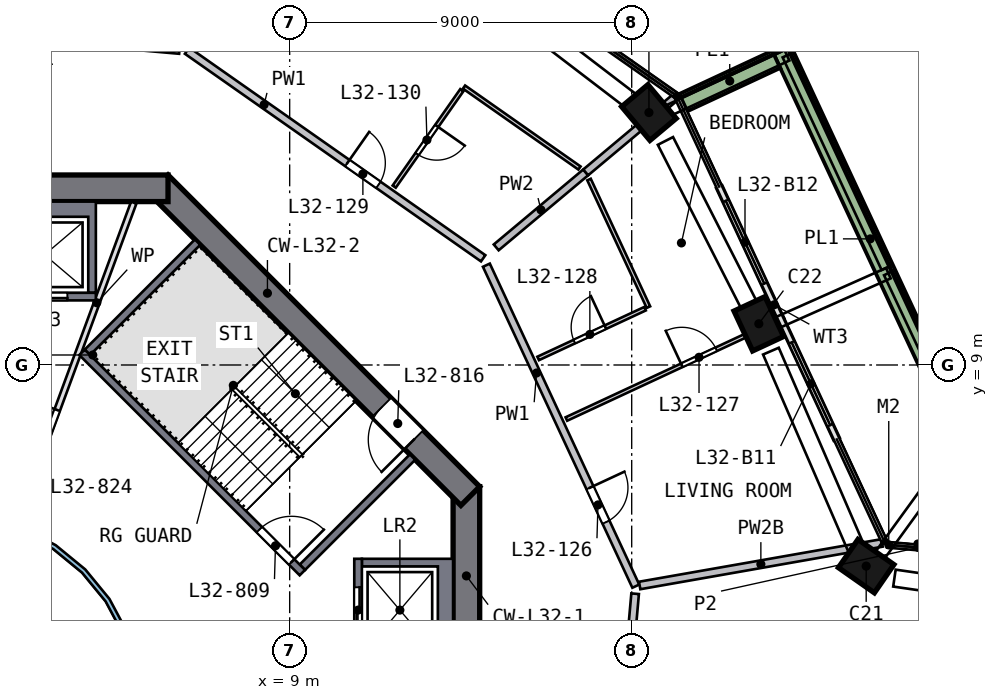
"""IFC4 building model, lengths in metres.
Left out: names, types, materials, properties, quantities, classifications, styles, units other than length and angle.
Written with IfcOpenShell. Run it as: python <this file> out.ifc"""

import sys

from ifc_helpers import new_model, si_unit, direction, frame, frame_2d, origin, origin_2d, place, context, subcontext, project, spatial, polyline, rectangle, outline, extrude, element, fill, save


model = new_model("IFC4")
c1 = context("Model", 3, precision=1e-05, world=origin(), true_north=direction((0.0, 1.0)))
c2 = subcontext(c1, "Body", "Model", "MODEL_VIEW")
j1 = project(units=[si_unit("LENGTHUNIT", "METRE"), si_unit("PLANEANGLEUNIT", "RADIAN")], contexts=[c1])
p1 = place(None, origin())
s1 = spatial("IfcSite", under=j1, at=p1, CompositionType="ELEMENT")
p2 = place(p1, origin())
s2 = spatial("IfcBuilding", under=s1, at=p2, CompositionType="ELEMENT")
p3 = place(p2, frame((0.0, 0.0, 136.5)))
s3 = spatial("IfcBuildingStorey", under=s2, at=p3, CompositionType="ELEMENT", Elevation=136.5)
p4 = place(p3, frame((24.192, 3.569, 0.0), z_axis=(-0.01793968, 0.114859561, 0.993219739), x_axis=(0.820036347, -0.566644336, 0.080340439)))
e1 = element("IfcColumn", 1, at=p4, inside=s3, PredefinedType="COLUMN", context=c2, shape_type="SweptSolid", body=[
    extrude(rectangle(XDim=1.15, YDim=0.9, at=origin_2d()), origin(), (0.0, 0.0, 1.0), 3.212),
])
p5 = place(p3, frame((21.403, 9.962, 0.0), z_axis=(-0.048216176, 0.101375651, 0.993679112), x_axis=(-0.419168471, 0.90094221, -0.112253848)))
e2 = element("IfcColumn", 2, at=p5, inside=s3, PredefinedType="COLUMN", context=c2, shape_type="SweptSolid", body=[
    extrude(rectangle(XDim=1.15, YDim=0.9, at=origin_2d()), origin(), (0.0, 0.0, 1.0), 3.21),
])
p6 = place(p3, frame((18.543, 15.538, 0.0), z_axis=(-0.074581932, 0.087582452, 0.993361389), x_axis=(0.637591081, -0.761738409, 0.115031341)))
e3 = element("IfcColumn", 3, at=p6, inside=s3, PredefinedType="COLUMN", context=c2, shape_type="SweptSolid", body=[
    extrude(rectangle(XDim=1.15, YDim=0.9, at=origin_2d()), origin(), (0.0, 0.0, 1.0), 3.211),
])
p7 = place(p3, frame((13.65, -5.799, 0.0), z_axis=(0.0, 0.0, 1.0), x_axis=(0.0, 1.0, 0.0)))
e4 = element("IfcWall", 4, at=p7, inside=s3, PredefinedType="SHEAR", context=c2, shape_type="SweptSolid", body=[
    extrude(rectangle(XDim=11.598, YDim=0.7, at=frame_2d((5.799, 0.0))), origin(), (0.0, 0.0, 1.0), 3.5),
])
p8 = place(p7, frame((4.899, 0.0, 0.0)))
e5 = element("IfcOpeningElement", 5, at=p8, cuts=e4, PredefinedType="OPENING", context=c2, shape_type="SweptSolid", body=[
    extrude(rectangle(XDim=1.8, YDim=2.1, at=frame_2d((0.9, 1.05))), frame((0.0, 0.36, 0.0), z_axis=(0.0, -1.0, 0.0), x_axis=(1.0, 0.0, 0.0)), (0.0, 0.0, 1.0), 0.72),
])
p9 = place(p3, frame((13.752, 5.552, 0.0), z_axis=(0.0, 0.0, 1.0), x_axis=(-0.707106781, 0.707106781, 0.0)))
e6 = element("IfcWall", 6, at=p9, inside=s3, PredefinedType="SHEAR", context=c2, shape_type="SweptSolid", body=[
    extrude(rectangle(XDim=11.598, YDim=0.7, at=frame_2d((5.799, 0.0))), origin(), (0.0, 0.0, 1.0), 3.5),
])
p10 = place(p9, frame((2.099, 0.0, 0.0)))
e7 = element("IfcOpeningElement", 7, at=p10, cuts=e6, PredefinedType="OPENING", context=c2, shape_type="SweptSolid", body=[
    extrude(rectangle(XDim=1.2, YDim=2.1, at=frame_2d((0.6, 1.05))), frame((0.0, 0.36, 0.0), z_axis=(0.0, -1.0, 0.0), x_axis=(1.0, 0.0, 0.0)), (0.0, 0.0, 1.0), 0.72),
])
p11 = place(p3, frame((5.799, 13.65, 0.0), z_axis=(0.0, 0.0, 1.0), x_axis=(-1.0, 0.0, 0.0)))
e8 = element("IfcWall", 8, at=p11, inside=s3, PredefinedType="SHEAR", context=c2, shape_type="SweptSolid", body=[
    extrude(rectangle(XDim=11.598, YDim=0.7, at=frame_2d((5.799, 0.0))), origin(), (0.0, 0.0, 1.0), 3.5),
])
p12 = place(p11, frame((4.899, 0.0, 0.0)))
e9 = element("IfcOpeningElement", 9, at=p12, cuts=e8, PredefinedType="OPENING", context=c2, shape_type="SweptSolid", body=[
    extrude(rectangle(XDim=1.8, YDim=2.1, at=frame_2d((0.9, 1.05))), frame((0.0, 0.36, 0.0), z_axis=(0.0, -1.0, 0.0), x_axis=(1.0, 0.0, 0.0)), (0.0, 0.0, 1.0), 0.72),
])
p13 = place(p3, frame((23.391, 7.055, 0.0), z_axis=(0.0, 0.0, 1.0), x_axis=(-0.422027589, 0.906582988, 0.0)))
e10 = element("IfcWall", 10, at=p13, inside=s3, PredefinedType="SOLIDWALL", context=c2, shape_type="SweptSolid", body=[
    extrude(rectangle(XDim=3.475, YDim=0.15, at=frame_2d((1.738, 0.0))), origin(), (0.0, 0.0, 1.0), 2.475),
])
p14 = place(p13, frame((0.4, 0.0, 0.0)))
e11 = element("IfcOpeningElement", 11, at=p14, cuts=e10, PredefinedType="OPENING", context=c2, shape_type="SweptSolid", body=[
    extrude(rectangle(XDim=2.4, YDim=2.4, at=frame_2d((1.2, 1.2))), frame((0.0, 0.085, 0.0), z_axis=(0.0, -1.0, 0.0), x_axis=(1.0, 0.0, 0.0)), (0.0, 0.0, 1.0), 0.17),
])
p15 = place(p3, frame((21.925, 10.205, 0.0), z_axis=(0.0, 0.0, 1.0), x_axis=(-0.421958321, 0.90661523, 0.0)))
e12 = element("IfcWall", 12, at=p15, inside=s3, PredefinedType="SOLIDWALL", context=c2, shape_type="SweptSolid", body=[
    extrude(rectangle(XDim=3.835, YDim=0.15, at=frame_2d((1.918, 0.0))), origin(), (0.0, 0.0, 1.0), 2.475),
])
p16 = place(p15, frame((1.035, 0.0, 0.0)))
e13 = element("IfcOpeningElement", 13, at=p16, cuts=e12, PredefinedType="OPENING", context=c2, shape_type="SweptSolid", body=[
    extrude(rectangle(XDim=2.4, YDim=2.4, at=frame_2d((1.2, 1.2))), frame((0.0, 0.085, 0.0), z_axis=(0.0, -1.0, 0.0), x_axis=(1.0, 0.0, 0.0)), (0.0, 0.0, 1.0), 0.17),
])
p17 = place(p3, frame((26.63, 7.264, 0.0), z_axis=(0.0, 0.0, 1.0), x_axis=(-0.421976843, 0.906606609, 0.0)))
e14 = element("IfcWall", 14, at=p17, inside=s3, PredefinedType="SOLIDWALL", context=c2, shape_type="SweptSolid", body=[
    extrude(rectangle(XDim=11.152, YDim=0.5, at=frame_2d((5.576, 0.0))), origin(), (0.0, 0.0, 1.0), 0.7),
])
p18 = place(p3, frame((21.803, 17.042, 0.0), z_axis=(0.0, 0.0, 1.0), x_axis=(-0.906596382, -0.421998815, 0.0)))
e15 = element("IfcWall", 15, at=p18, inside=s3, PredefinedType="SOLIDWALL", context=c2, shape_type="SweptSolid", body=[
    extrude(rectangle(XDim=2.699, YDim=0.5, at=frame_2d((1.35, 0.0))), origin(), (0.0, 0.0, 1.0), 0.7),
])
p19 = place(p3, origin())
e16 = element("IfcWall", 16, at=p19, inside=s3, PredefinedType="SOLIDWALL", context=c2, shape_type="SweptSolid", body=[
    extrude(outline(polyline([(13.3, 3.9), (13.3, 1.2), (10.9, 1.2), (10.9, 1.4), (12.9, 1.4), (12.9, 3.7), (10.9, 3.7), (10.9, 3.9), (13.3, 3.9)])), origin(), (0.0, 0.0, 1.0), 3.19),
])
p20 = place(p3, frame((10.8, 1.2, 0.0), z_axis=(0.0, 0.0, 1.0), x_axis=(0.0, 1.0, 0.0)))
e17 = element("IfcWall", 17, at=p20, inside=s3, PredefinedType="SOLIDWALL", context=c2, shape_type="SweptSolid", body=[
    extrude(rectangle(XDim=2.7, YDim=0.2, at=frame_2d((1.35, 0.0))), origin(), (0.0, 0.0, 1.0), 3.19),
])
p21 = place(p20, frame((0.75, 0.0, 0.0)))
e18 = element("IfcOpeningElement", 18, at=p21, cuts=e17, PredefinedType="OPENING", context=c2, shape_type="SweptSolid", body=[
    extrude(rectangle(XDim=1.2, YDim=2.1, at=frame_2d((0.6, 1.05))), frame((0.0, 0.11, 0.0), z_axis=(0.0, -1.0, 0.0), x_axis=(1.0, 0.0, 0.0)), (0.0, 0.0, 1.0), 0.22),
])
p22 = place(p3, origin())
e19 = element("IfcWall", 19, at=p22, inside=s3, PredefinedType="SOLIDWALL", context=c2, shape_type="SweptSolid", body=[
    extrude(outline(polyline([(3.9, 13.3), (3.9, 10.9), (3.7, 10.9), (3.7, 12.9), (1.4, 12.9), (1.4, 10.9), (1.2, 10.9), (1.2, 13.3), (3.9, 13.3)])), origin(), (0.0, 0.0, 1.0), 3.19),
])
p23 = place(p3, frame((1.2, 10.8, 0.0), z_axis=(0.0, 0.0, 1.0), x_axis=(1.0, 0.0, 0.0)))
e20 = element("IfcWall", 20, at=p23, inside=s3, PredefinedType="SOLIDWALL", context=c2, shape_type="SweptSolid", body=[
    extrude(rectangle(XDim=2.7, YDim=0.2, at=frame_2d((1.35, 0.0))), origin(), (0.0, 0.0, 1.0), 3.19),
])
p24 = place(p23, frame((0.75, 0.0, 0.0)))
e21 = element("IfcOpeningElement", 21, at=p24, cuts=e20, PredefinedType="OPENING", context=c2, shape_type="SweptSolid", body=[
    extrude(rectangle(XDim=1.2, YDim=2.1, at=frame_2d((0.6, 1.05))), frame((0.0, 0.11, 0.0), z_axis=(0.0, -1.0, 0.0), x_axis=(1.0, 0.0, 0.0)), (0.0, 0.0, 1.0), 0.22),
])
p25 = place(p3, frame((3.535, 9.334, 0.0), z_axis=(0.0, 0.0, 1.0), x_axis=(0.707106781, -0.707106781, 0.0)))
e22 = element("IfcWall", 22, at=p25, inside=s3, PredefinedType="SOLIDWALL", context=c2, shape_type="SweptSolid", body=[
    extrude(rectangle(XDim=8.2, YDim=0.2, at=frame_2d((4.1, 0.0))), origin(), (0.0, 0.0, 1.0), 3.19),
])
p26 = place(p25, frame((6.6, 0.0, 0.0)))
e23 = element("IfcOpeningElement", 23, at=p26, cuts=e22, PredefinedType="OPENING", context=c2, shape_type="SweptSolid", body=[
    extrude(rectangle(XDim=1.2, YDim=2.1, at=frame_2d((0.6, 1.05))), frame((0.0, 0.11, 0.0), z_axis=(0.0, -1.0, 0.0), x_axis=(1.0, 0.0, 0.0)), (0.0, 0.0, 1.0), 0.22),
])
for number, where, z_axis, x_axis in (
    (24, (9.334, 3.677, 0.0), (0.0, 0.0, 1.0), (0.707, 0.707, 0.0)),
    (25, (3.677, 9.334, 0.0), (0.0, 0.0, 1.0), (0.707, 0.707, 0.0)),
):
    element("IfcWall", number, at=place(p3, frame(where, z_axis=z_axis, x_axis=x_axis)), inside=s3, PredefinedType="SOLIDWALL", context=c2, shape_type="SweptSolid", body=[
        extrude(rectangle(XDim=4.1, YDim=0.2, at=frame_2d((2.05, 0.0))), origin(), (0.0, 0.0, 1.0), 3.19),
    ])
p27 = place(p3, frame((1.776, 4.813, 0.0), z_axis=(0.0, 0.0, 1.0), x_axis=(0.346109381, 0.938194168, 0.0)))
e26 = element("IfcWall", 26, at=p27, inside=s3, PredefinedType="PARTITIONING", context=c2, shape_type="SweptSolid", body=[
    extrude(rectangle(XDim=9.016, YDim=0.15, at=frame_2d((4.508, 0.0))), origin(), (0.0, 0.0, 1.0), 3.19),
])
p28 = place(p27, frame((1.4, 0.0, 0.0)))
e27 = element("IfcOpeningElement", 27, at=p28, cuts=e26, PredefinedType="OPENING", context=c2, shape_type="SweptSolid", body=[
    extrude(rectangle(XDim=1.8, YDim=2.1, at=frame_2d((0.9, 1.05))), frame((0.0, 0.085, 0.0), z_axis=(0.0, -1.0, 0.0), x_axis=(1.0, 0.0, 0.0)), (0.0, 0.0, 1.0), 0.17),
])
p29 = place(p3, origin())
e28 = element("IfcWall", 28, at=p29, inside=s3, PredefinedType="SOLIDWALL", context=c2, shape_type="SweptSolid", body=[
    extrude(outline(polyline([(5.021, -0.999), (4.73, -1.959), (4.257, -2.844), (3.62, -3.62), (2.844, -4.257), (1.959, -4.73), (0.999, -5.021), (0.0, -5.12), (-0.999, -5.021), (-1.959, -4.73), (-2.844, -4.257), (-3.62, -3.62), (-4.257, -2.844), (-4.73, -1.959), (-5.021, -0.999), (-5.12, 0.0), (-5.021, 0.999), (-4.73, 1.959), (-4.257, 2.844), (-3.62, 3.62), (-2.844, 4.257), (-1.959, 4.73), (-0.999, 5.021), (0.0, 5.12), (0.999, 5.021), (1.959, 4.73), (2.844, 4.257), (3.62, 3.62), (4.257, 2.844), (4.73, 1.959), (5.021, 0.999), (5.12, 0.0), (5.021, -0.999)]), holes=[polyline([(4.904, 0.976), (4.619, 1.913), (4.157, 2.778), (3.535, 3.535), (2.778, 4.157), (1.913, 4.619), (0.976, 4.904), (0.0, 5.0), (-0.976, 4.904), (-1.913, 4.619), (-2.778, 4.157), (-3.535, 3.535), (-4.157, 2.778), (-4.619, 1.913), (-4.904, 0.976), (-5.0, 0.0), (-4.904, -0.976), (-4.619, -1.913), (-4.157, -2.778), (-3.535, -3.535), (-2.778, -4.157), (-1.913, -4.619), (-0.976, -4.904), (0.0, -5.0), (0.976, -4.904), (1.913, -4.619), (2.778, -4.157), (3.535, -3.535), (4.157, -2.778), (4.619, -1.913), (4.904, -0.976), (5.0, 0.0), (4.904, 0.976)])]), origin(), (0.0, 0.0, 1.0), 3.19),
])
p30 = place(p3, frame((-3.18, 18.108, 0.0), z_axis=(0.0, 0.0, 1.0), x_axis=(0.996134235, -0.087844097, 0.0)))
e29 = element("IfcWall", 29, at=p30, inside=s3, PredefinedType="SOLIDWALL", context=c2, shape_type="SweptSolid", body=[
    extrude(rectangle(XDim=9.316, YDim=0.2, at=frame_2d((4.658, 0.0))), origin(), (0.0, 0.0, 1.0), 3.19),
])
p31 = place(p30, frame((0.55, 0.0, 0.0)))
e30 = element("IfcOpeningElement", 30, at=p31, cuts=e29, PredefinedType="OPENING", context=c2, shape_type="SweptSolid", body=[
    extrude(rectangle(XDim=1.0, YDim=2.1, at=frame_2d((0.5, 1.05))), frame((0.0, 0.11, 0.0), z_axis=(0.0, -1.0, 0.0), x_axis=(1.0, 0.0, 0.0)), (0.0, 0.0, 1.0), 0.22),
])
p32 = place(p3, frame((6.301, 17.271, 0.0), z_axis=(0.0, 0.0, 1.0), x_axis=(0.818750717, -0.574149165, 0.0)))
e31 = element("IfcWall", 31, at=p32, inside=s3, PredefinedType="SOLIDWALL", context=c2, shape_type="SweptSolid", body=[
    extrude(rectangle(XDim=9.516, YDim=0.2, at=frame_2d((4.758, 0.0))), origin(), (0.0, 0.0, 1.0), 3.19),
])
p33 = place(p32, frame((5.15, 0.0, 0.0)))
e32 = element("IfcOpeningElement", 32, at=p33, cuts=e31, PredefinedType="OPENING", context=c2, shape_type="SweptSolid", body=[
    extrude(rectangle(XDim=1.0, YDim=2.1, at=frame_2d((0.5, 1.05))), frame((0.0, 0.11, 0.0), z_axis=(0.0, -1.0, 0.0), x_axis=(1.0, 0.0, 0.0)), (0.0, 0.0, 1.0), 0.22),
])
p34 = place(p3, frame((14.176, 11.626, 0.0), z_axis=(0.0, 0.0, 1.0), x_axis=(0.421965711, -0.906611791, 0.0)))
e33 = element("IfcWall", 33, at=p34, inside=s3, PredefinedType="SOLIDWALL", context=c2, shape_type="SweptSolid", body=[
    extrude(rectangle(XDim=9.317, YDim=0.2, at=frame_2d((4.658, 0.0))), origin(), (0.0, 0.0, 1.0), 3.19),
])
p35 = place(p34, frame((6.458, 0.0, 0.0)))
e34 = element("IfcOpeningElement", 34, at=p35, cuts=e33, PredefinedType="OPENING", context=c2, shape_type="SweptSolid", body=[
    extrude(rectangle(XDim=1.0, YDim=2.1, at=frame_2d((0.5, 1.05))), frame((0.0, 0.11, 0.0), z_axis=(0.0, -1.0, 0.0), x_axis=(1.0, 0.0, 0.0)), (0.0, 0.0, 1.0), 0.22),
])
p36 = place(p3, frame((17.804, -0.265, 0.0), z_axis=(0.0, 0.0, 1.0), x_axis=(0.087812903, 0.996136986, 0.0)))
e35 = element("IfcWall", 35, at=p36, inside=s3, PredefinedType="SOLIDWALL", context=c2, shape_type="SweptSolid", body=[
    extrude(rectangle(XDim=3.259, YDim=0.2, at=frame_2d((1.629, 0.0))), origin(), (0.0, 0.0, 1.0), 3.19),
])
p37 = place(p3, frame((14.435, 12.095, 0.0), z_axis=(0.0, 0.0, 1.0), x_axis=(0.766505681, 0.642237527, 0.0)))
e36 = element("IfcWall", 36, at=p37, inside=s3, PredefinedType="SOLIDWALL", context=c2, shape_type="SweptSolid", body=[
    extrude(rectangle(XDim=3.073, YDim=0.2, at=frame_2d((1.536, 0.0))), origin(), (0.0, 0.0, 1.0), 3.19),
])
p38 = place(p3, frame((16.79, 14.068, 0.0), z_axis=(0.0, 0.0, 1.0), x_axis=(0.766498184, 0.642246474, 0.0)))
e37 = element("IfcWall", 37, at=p38, inside=s3, PredefinedType="SOLIDWALL", context=c2, shape_type="SweptSolid", body=[
    extrude(rectangle(XDim=3.059, YDim=0.2, at=frame_2d((1.53, 0.0))), origin(), (0.0, 0.0, 1.0), 3.19),
])
p39 = place(p3, frame((18.21, 3.198, 0.0), z_axis=(0.0, 0.0, 1.0), x_axis=(0.984927066, 0.172970158, 0.0)))
e38 = element("IfcWall", 38, at=p39, inside=s3, PredefinedType="SOLIDWALL", context=c2, shape_type="SweptSolid", body=[
    extrude(rectangle(XDim=6.476, YDim=0.2, at=frame_2d((3.238, 0.0))), origin(), (0.0, 0.0, 1.0), 2.69),
])
p40 = place(p3, frame((13.53, 16.232, 0.0), z_axis=(0.0, 0.0, 1.0), x_axis=(-0.574138719, -0.818758042, 0.0)))
e39 = element("IfcWall", 39, at=p40, inside=s3, PredefinedType="PARTITIONING", context=c2, shape_type="SweptSolid", body=[
    extrude(rectangle(XDim=3.1, YDim=0.1, at=frame_2d((1.55, 0.0))), origin(), (0.0, 0.0, 1.0), 3.19),
])
p41 = place(p40, frame((1.15, 0.0, 0.0)))
e40 = element("IfcOpeningElement", 40, at=p41, cuts=e39, PredefinedType="OPENING", context=c2, shape_type="SweptSolid", body=[
    extrude(rectangle(XDim=0.9, YDim=2.1, at=frame_2d((0.45, 1.05))), frame((0.0, 0.06, 0.0), z_axis=(0.0, -1.0, 0.0), x_axis=(1.0, 0.0, 0.0)), (0.0, 0.0, 1.0), 0.12),
])
p42 = place(p3, frame((13.588, 16.314, 0.0), z_axis=(0.0, 0.0, 1.0), x_axis=(0.818743323, -0.574159708, 0.0)))
e41 = element("IfcWall", 41, at=p42, inside=s3, PredefinedType="PARTITIONING", context=c2, shape_type="SweptSolid", body=[
    extrude(rectangle(XDim=3.711, YDim=0.1, at=frame_2d((1.855, 0.0))), origin(), (0.0, 0.0, 1.0), 3.19),
])
p43 = place(p3, frame((15.539, 9.172, 0.0), z_axis=(0.0, 0.0, 1.0), x_axis=(0.906613229, 0.42196262, 0.0)))
e42 = element("IfcWall", 42, at=p43, inside=s3, PredefinedType="PARTITIONING", context=c2, shape_type="SweptSolid", body=[
    extrude(rectangle(XDim=3.1, YDim=0.1, at=frame_2d((1.55, 0.0))), origin(), (0.0, 0.0, 1.0), 3.19),
])
p44 = place(p43, frame((1.05, 0.0, 0.0)))
e43 = element("IfcOpeningElement", 43, at=p44, cuts=e42, PredefinedType="OPENING", context=c2, shape_type="SweptSolid", body=[
    extrude(rectangle(XDim=0.9, YDim=2.1, at=frame_2d((0.45, 1.05))), frame((0.0, 0.06, 0.0), z_axis=(0.0, -1.0, 0.0), x_axis=(1.0, 0.0, 0.0)), (0.0, 0.0, 1.0), 0.12),
])
p45 = place(p3, frame((18.44, 10.523, 0.0), z_axis=(0.0, 0.0, 1.0), x_axis=(-0.421990349, 0.906600323, 0.0)))
e44 = element("IfcWall", 44, at=p45, inside=s3, PredefinedType="PARTITIONING", context=c2, shape_type="SweptSolid", body=[
    extrude(rectangle(XDim=3.704, YDim=0.1, at=frame_2d((1.852, 0.0))), origin(), (0.0, 0.0, 1.0), 3.19),
])
p46 = place(p3, frame((16.281, 7.578, 0.0), z_axis=(0.0, 0.0, 1.0), x_axis=(0.90660458, 0.421981202, 0.0)))
e45 = element("IfcWall", 45, at=p46, inside=s3, PredefinedType="PARTITIONING", context=c2, shape_type="SweptSolid", body=[
    extrude(rectangle(XDim=6.15, YDim=0.1, at=frame_2d((3.075, 0.0))), origin(), (0.0, 0.0, 1.0), 3.19),
])
p47 = place(p46, frame((3.35, 0.0, 0.0)))
e46 = element("IfcOpeningElement", 46, at=p47, cuts=e45, PredefinedType="OPENING", context=c2, shape_type="SweptSolid", body=[
    extrude(rectangle(XDim=1.0, YDim=2.1, at=frame_2d((0.5, 1.05))), frame((0.0, 0.06, 0.0), z_axis=(0.0, -1.0, 0.0), x_axis=(1.0, 0.0, 0.0)), (0.0, 0.0, 1.0), 0.12),
])
p48 = place(p14, origin())
e47 = element("IfcDoor", 47, at=p48, inside=s3, OperationType="SLIDING_TO_RIGHT", PredefinedType="DOOR", context=c2, shape_type="SweptSolid", body=[
    extrude(rectangle(XDim=2.4, YDim=2.4, at=frame_2d((1.2, 1.2))), frame((0.0, 0.025, 0.0), z_axis=(0.0, -1.0, 0.0), x_axis=(1.0, 0.0, 0.0)), (0.0, 0.0, 1.0), 0.05),
])
fill(e11, e47)
p49 = place(p16, origin())
e48 = element("IfcDoor", 48, at=p49, inside=s3, OperationType="SLIDING_TO_LEFT", PredefinedType="DOOR", context=c2, shape_type="SweptSolid", body=[
    extrude(rectangle(XDim=2.4, YDim=2.4, at=frame_2d((1.2, 1.2))), frame((0.0, 0.025, 0.0), z_axis=(0.0, -1.0, 0.0), x_axis=(1.0, 0.0, 0.0)), (0.0, 0.0, 1.0), 0.05),
])
fill(e13, e48)
p50 = place(p21, origin())
e49 = element("IfcDoor", 49, at=p50, inside=s3, OperationType="DOUBLE_DOOR_SLIDING", PredefinedType="DOOR", context=c2, shape_type="SweptSolid", body=[
    extrude(rectangle(XDim=1.2, YDim=2.1, at=frame_2d((0.6, 1.05))), frame((0.0, 0.025, 0.0), z_axis=(0.0, -1.0, 0.0), x_axis=(1.0, 0.0, 0.0)), (0.0, 0.0, 1.0), 0.05),
])
fill(e18, e49)
p51 = place(p24, origin())
e50 = element("IfcDoor", 50, at=p51, inside=s3, OperationType="DOUBLE_DOOR_SLIDING", PredefinedType="DOOR", context=c2, shape_type="SweptSolid", body=[
    extrude(rectangle(XDim=1.2, YDim=2.1, at=frame_2d((0.6, 1.05))), frame((0.0, 0.025, 0.0), z_axis=(0.0, -1.0, 0.0), x_axis=(1.0, 0.0, 0.0)), (0.0, 0.0, 1.0), 0.05),
])
fill(e21, e50)
p52 = place(p26, origin())
e51 = element("IfcDoor", 51, at=p52, inside=s3, OperationType="SINGLE_SWING_RIGHT", PredefinedType="DOOR", context=c2, shape_type="SweptSolid", body=[
    extrude(rectangle(XDim=1.2, YDim=2.1, at=frame_2d((0.6, 1.05))), frame((0.0, 0.025, 0.0), z_axis=(0.0, -1.0, 0.0), x_axis=(1.0, 0.0, 0.0)), (0.0, 0.0, 1.0), 0.05),
])
fill(e23, e51)
p53 = place(p10, origin())
e52 = element("IfcDoor", 52, at=p53, inside=s3, OperationType="SINGLE_SWING_LEFT", PredefinedType="DOOR", context=c2, shape_type="SweptSolid", body=[
    extrude(rectangle(XDim=1.2, YDim=2.1, at=frame_2d((0.6, 1.05))), frame((0.0, 0.025, 0.0), z_axis=(0.0, -1.0, 0.0), x_axis=(1.0, 0.0, 0.0)), (0.0, 0.0, 1.0), 0.05),
])
fill(e7, e52)
p54 = place(p28, origin())
e53 = element("IfcDoor", 53, at=p54, inside=s3, OperationType="DOUBLE_DOOR_SINGLE_SWING", PredefinedType="DOOR", context=c2, shape_type="SweptSolid", body=[
    extrude(rectangle(XDim=1.8, YDim=2.1, at=frame_2d((0.9, 1.05))), frame((0.0, 0.025, 0.0), z_axis=(0.0, -1.0, 0.0), x_axis=(1.0, 0.0, 0.0)), (0.0, 0.0, 1.0), 0.05),
])
fill(e27, e53)
p55 = place(p35, origin())
e54 = element("IfcDoor", 54, at=p55, inside=s3, OperationType="SINGLE_SWING_LEFT", PredefinedType="DOOR", context=c2, shape_type="SweptSolid", body=[
    extrude(rectangle(XDim=1.0, YDim=2.1, at=frame_2d((0.5, 1.05))), frame((0.0, 0.025, 0.0), z_axis=(0.0, -1.0, 0.0), x_axis=(1.0, 0.0, 0.0)), (0.0, 0.0, 1.0), 0.05),
])
fill(e34, e54)
p56 = place(p47, origin())
e55 = element("IfcDoor", 55, at=p56, inside=s3, OperationType="SINGLE_SWING_LEFT", PredefinedType="DOOR", context=c2, shape_type="SweptSolid", body=[
    extrude(rectangle(XDim=1.0, YDim=2.1, at=frame_2d((0.5, 1.05))), frame((0.0, 0.025, 0.0), z_axis=(0.0, -1.0, 0.0), x_axis=(1.0, 0.0, 0.0)), (0.0, 0.0, 1.0), 0.05),
])
fill(e46, e55)
p57 = place(p44, origin())
e56 = element("IfcDoor", 56, at=p57, inside=s3, OperationType="SINGLE_SWING_RIGHT", PredefinedType="DOOR", context=c2, shape_type="SweptSolid", body=[
    extrude(rectangle(XDim=0.9, YDim=2.1, at=frame_2d((0.45, 1.05))), frame((0.0, 0.025, 0.0), z_axis=(0.0, -1.0, 0.0), x_axis=(1.0, 0.0, 0.0)), (0.0, 0.0, 1.0), 0.05),
])
fill(e43, e56)
p58 = place(p33, origin())
e57 = element("IfcDoor", 57, at=p58, inside=s3, OperationType="SINGLE_SWING_LEFT", PredefinedType="DOOR", context=c2, shape_type="SweptSolid", body=[
    extrude(rectangle(XDim=1.0, YDim=2.1, at=frame_2d((0.5, 1.05))), frame((0.0, 0.025, 0.0), z_axis=(0.0, -1.0, 0.0), x_axis=(1.0, 0.0, 0.0)), (0.0, 0.0, 1.0), 0.05),
])
fill(e32, e57)
p59 = place(p41, origin())
e58 = element("IfcDoor", 58, at=p59, inside=s3, OperationType="SINGLE_SWING_LEFT", PredefinedType="DOOR", context=c2, shape_type="SweptSolid", body=[
    extrude(rectangle(XDim=0.9, YDim=2.1, at=frame_2d((0.45, 1.05))), frame((0.0, 0.025, 0.0), z_axis=(0.0, -1.0, 0.0), x_axis=(1.0, 0.0, 0.0)), (0.0, 0.0, 1.0), 0.05),
])
fill(e40, e58)
save(model, sys.argv[1])
